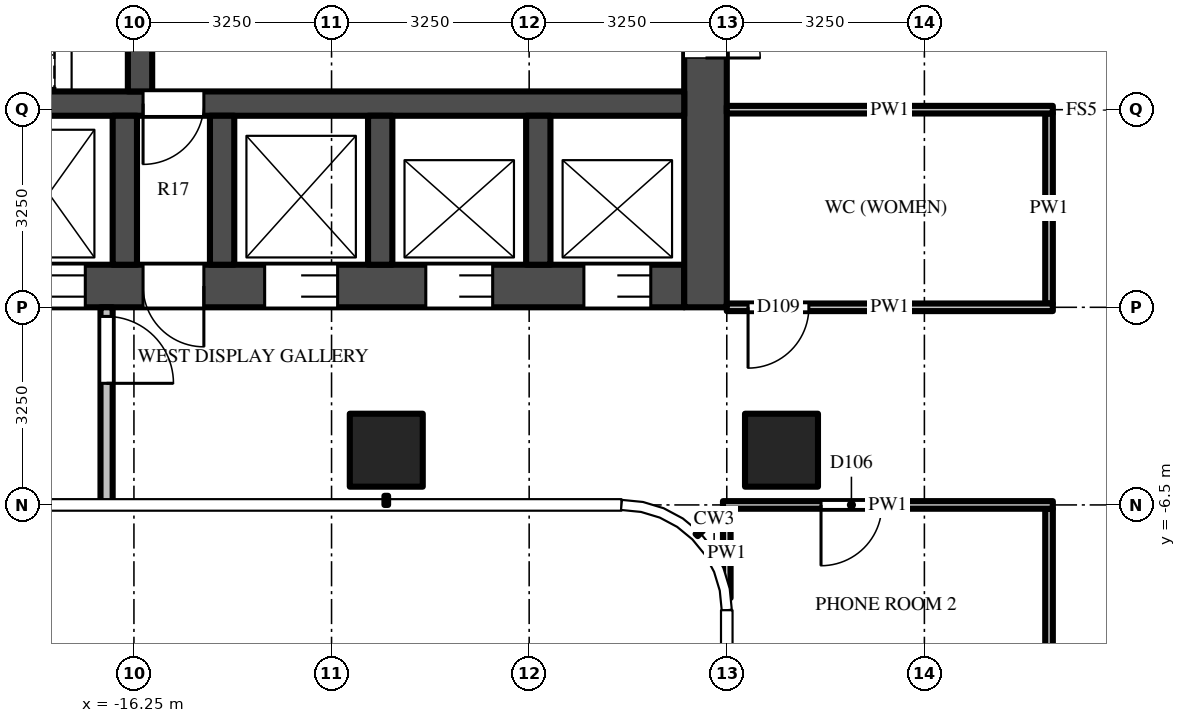
"""IFC4 building model, lengths in metres.
Left out: names, types, materials, properties, quantities, classifications, styles, units other than length and angle.
Written with IfcOpenShell. Run it as: python <this file> out.ifc"""

import sys

from ifc_helpers import new_model, si_unit, direction, frame, frame_2d, origin, origin_2d, place, context, subcontext, project, spatial, rectangle, extrude, source, transform, mapped, element, fill, save


model = new_model("IFC4")
c1 = context("Model", 3, precision=1e-05, world=origin(), true_north=direction((0.0, 1.0)))
c2 = subcontext(c1, "Body", "Model", "MODEL_VIEW")
j1 = project(units=[si_unit("LENGTHUNIT", "METRE"), si_unit("PLANEANGLEUNIT", "RADIAN")], contexts=[c1])
p1 = place(None, origin())
s1 = spatial("IfcSite", under=j1, at=p1, CompositionType="ELEMENT")
p2 = place(p1, origin())
s2 = spatial("IfcBuilding", under=s1, at=p2, CompositionType="ELEMENT")
p3 = place(p2, frame((0.0, 0.0, 173.7)))
s3 = spatial("IfcBuildingStorey", under=s2, at=p3, CompositionType="ELEMENT", Elevation=173.7)
m1 = source(origin(), c2, "Body", "SweptSolid", [
    extrude(rectangle(XDim=1.2, YDim=1.2, at=origin_2d()), origin(), (0.0, 0.0, 1.0), 3.9),
])
for number, where, z_axis, x_axis in (
    (1, (-5.6, -5.6, 0.0), (0.0, 0.0, 1.0), (1.0, 0.0, 0.0)),
    (2, (-12.1, -5.6, 0.0), (0.0, 0.0, 1.0), (1.0, 0.0, 0.0)),
):
    element("IfcColumn", number, at=place(p3, frame(where, z_axis=z_axis, x_axis=x_axis)), inside=s3, PredefinedType="COLUMN", context=c2, shape_type="MappedRepresentation", body=[
        mapped(m1, transform((0.0, 0.0, 0.0))),
    ])
m2 = source(origin(), c2, "Body", "SweptSolid", [
    extrude(rectangle(XDim=14.85, YDim=0.7, at=frame_2d((7.425, 0.0))), origin(), (0.0, 0.0, 1.0), 3.7),
])
p4 = place(p3, frame((-7.2, -2.9, 0.0), z_axis=(0.0, 0.0, 1.0), x_axis=(-1.0, 0.0, 0.0)))
e3 = element("IfcWall", 3, at=p4, inside=s3, PredefinedType="SHEAR", context=c2, shape_type="MappedRepresentation", body=[
    mapped(m2, transform((0.0, 0.0, 0.0))),
])
m3 = source(origin(), c2, "Body", "SweptSolid", [
    extrude(rectangle(XDim=1.1, YDim=2.1, at=frame_2d((0.55, 1.05))), frame((0.0, 0.36, 0.0), z_axis=(0.0, -1.0, 0.0), x_axis=(1.0, 0.0, 0.0)), (0.0, 0.0, 1.0), 0.72),
])
p5 = place(p4, frame((0.55, 0.0, 0.0)))
e4 = element("IfcOpeningElement", 4, at=p5, cuts=e3, PredefinedType="OPENING", context=c2, shape_type="MappedRepresentation", body=[
    mapped(m3, transform((0.0, 0.0, 0.0))),
])
p6 = place(p4, frame((3.15, 0.0, 0.0)))
e5 = element("IfcOpeningElement", 5, at=p6, cuts=e3, PredefinedType="OPENING", context=c2, shape_type="MappedRepresentation", body=[
    mapped(m3, transform((0.0, 0.0, 0.0))),
])
m4 = source(origin(), c2, "Body", "SweptSolid", [
    extrude(rectangle(XDim=1.2, YDim=2.1, at=frame_2d((0.6, 1.05))), frame((0.0, 0.36, 0.0), z_axis=(0.0, -1.0, 0.0), x_axis=(1.0, 0.0, 0.0)), (0.0, 0.0, 1.0), 0.72),
])
p7 = place(p4, frame((5.7, 0.0, 0.0)))
e6 = element("IfcOpeningElement", 6, at=p7, cuts=e3, PredefinedType="OPENING", context=c2, shape_type="MappedRepresentation", body=[
    mapped(m4, transform((0.0, 0.0, 0.0))),
])
m5 = source(origin(), c2, "Body", "SweptSolid", [
    extrude(rectangle(XDim=1.3, YDim=2.1, at=frame_2d((0.65, 1.05))), frame((0.0, 0.36, 0.0), z_axis=(0.0, -1.0, 0.0), x_axis=(1.0, 0.0, 0.0)), (0.0, 0.0, 1.0), 0.72),
])
p8 = place(p4, frame((12.2, 0.0, 0.0)))
e7 = element("IfcOpeningElement", 7, at=p8, cuts=e3, PredefinedType="OPENING", context=c2, shape_type="MappedRepresentation", body=[
    mapped(m5, transform((0.0, 0.0, 0.0))),
])
p9 = place(p4, frame((9.85, 0.0, 0.0)))
e8 = element("IfcOpeningElement", 8, at=p9, cuts=e3, PredefinedType="OPENING", context=c2, shape_type="MappedRepresentation", body=[
    mapped(m4, transform((0.0, 0.0, 0.0))),
])
m6 = source(origin(), c2, "Body", "SweptSolid", [
    extrude(rectangle(XDim=1.0, YDim=2.1, at=frame_2d((0.5, 1.05))), frame((0.0, 0.36, 0.0), z_axis=(0.0, -1.0, 0.0), x_axis=(1.0, 0.0, 0.0)), (0.0, 0.0, 1.0), 0.72),
])
p10 = place(p4, frame((7.9, 0.0, 0.0)))
e9 = element("IfcOpeningElement", 9, at=p10, cuts=e3, PredefinedType="OPENING", context=c2, shape_type="MappedRepresentation", body=[
    mapped(m6, transform((0.0, 0.0, 0.0))),
])
m7 = source(origin(), c2, "Body", "SweptSolid", [
    extrude(rectangle(XDim=9.05, YDim=0.7, at=frame_2d((4.525, 0.0))), origin(), (0.0, 0.0, 1.0), 3.7),
])
p11 = place(p3, frame((-6.85, 5.8, 0.0), z_axis=(0.0, 0.0, 1.0), x_axis=(0.0, -1.0, 0.0)))
e10 = element("IfcWall", 10, at=p11, inside=s3, PredefinedType="SHEAR", context=c2, shape_type="MappedRepresentation", body=[
    mapped(m7, transform((0.0, 0.0, 0.0))),
])
m8 = source(origin(), c2, "Body", "SweptSolid", [
    extrude(rectangle(XDim=1.8, YDim=2.1, at=frame_2d((0.9, 1.05))), frame((0.0, 0.36, 0.0), z_axis=(0.0, -1.0, 0.0), x_axis=(1.0, 0.0, 0.0)), (0.0, 0.0, 1.0), 0.72),
])
p12 = place(p11, frame((3.15, 0.0, 0.0)))
e11 = element("IfcOpeningElement", 11, at=p12, cuts=e10, PredefinedType="OPENING", context=c2, shape_type="MappedRepresentation", body=[
    mapped(m8, transform((0.0, 0.0, 0.0))),
])
m9 = source(origin(), c2, "Body", "SweptSolid", [
    extrude(rectangle(XDim=14.85, YDim=0.4, at=frame_2d((7.425, 0.0))), origin(), (0.0, 0.0, 1.0), 3.7),
])
p13 = place(p3, frame((-7.2, 0.1, 0.0), z_axis=(0.0, 0.0, 1.0), x_axis=(-1.0, 0.0, 0.0)))
e12 = element("IfcWall", 12, at=p13, inside=s3, PredefinedType="SHEAR", context=c2, shape_type="MappedRepresentation", body=[
    mapped(m9, transform((0.0, 0.0, 0.0))),
])
m10 = source(origin(), c2, "Body", "SweptSolid", [
    extrude(rectangle(XDim=1.0, YDim=2.1, at=frame_2d((0.5, 1.05))), frame((0.0, 0.21, 0.0), z_axis=(0.0, -1.0, 0.0), x_axis=(1.0, 0.0, 0.0)), (0.0, 0.0, 1.0), 0.42),
])
p14 = place(p13, frame((7.9, 0.0, 0.0)))
e13 = element("IfcOpeningElement", 13, at=p14, cuts=e12, PredefinedType="OPENING", context=c2, shape_type="MappedRepresentation", body=[
    mapped(m10, transform((0.0, 0.0, 0.0))),
])
m11 = source(origin(), c2, "Body", "SweptSolid", [
    extrude(rectangle(XDim=5.5, YDim=0.4, at=frame_2d((2.75, 0.0))), origin(), (0.0, 0.0, 1.0), 3.7),
])
p15 = place(p3, frame((-16.15, 5.8, 0.0), z_axis=(0.0, 0.0, 1.0), x_axis=(0.0, -1.0, 0.0)))
e14 = element("IfcWall", 14, at=p15, inside=s3, PredefinedType="SHEAR", context=c2, shape_type="MappedRepresentation", body=[
    mapped(m11, transform((0.0, 0.0, 0.0))),
])
m12 = source(origin(), c2, "Body", "SweptSolid", [
    extrude(rectangle(XDim=1.1, YDim=2.1, at=frame_2d((0.55, 1.05))), frame((0.0, 0.21, 0.0), z_axis=(0.0, -1.0, 0.0), x_axis=(1.0, 0.0, 0.0)), (0.0, 0.0, 1.0), 0.42),
])
p16 = place(p15, frame((0.725, 0.0, 0.0)))
e15 = element("IfcOpeningElement", 15, at=p16, cuts=e14, PredefinedType="OPENING", context=c2, shape_type="MappedRepresentation", body=[
    mapped(m12, transform((0.0, 0.0, 0.0))),
])
p17 = place(p15, frame((3.675, 0.0, 0.0)))
e16 = element("IfcOpeningElement", 16, at=p17, cuts=e14, PredefinedType="OPENING", context=c2, shape_type="MappedRepresentation", body=[
    mapped(m12, transform((0.0, 0.0, 0.0))),
])
m13 = source(origin(), c2, "Body", "SweptSolid", [
    extrude(rectangle(XDim=2.45, YDim=0.4, at=frame_2d((1.225, 0.0))), origin(), (0.0, 0.0, 1.0), 3.7),
])
for number, where, z_axis, x_axis in (
    (17, (-9.6, -0.1, 0.0), (0.0, 0.0, 1.0), (0.0, -1.0, 0.0)),
    (18, (-12.2, -0.1, 0.0), (0.0, 0.0, 1.0), (0.0, -1.0, 0.0)),
    (19, (-14.8, -0.1, 0.0), (0.0, 0.0, 1.0), (0.0, -1.0, 0.0)),
    (20, (-16.4, -0.1, 0.0), (0.0, 0.0, 1.0), (0.0, -1.0, 0.0)),
):
    element("IfcWall", number, at=place(p3, frame(where, z_axis=z_axis, x_axis=x_axis)), inside=s3, PredefinedType="SHEAR", context=c2, shape_type="MappedRepresentation", body=[
        mapped(m13, transform((0.0, 0.0, 0.0))),
    ])
m14 = source(origin(), c2, "Body", "SweptSolid", [
    extrude(rectangle(XDim=3.25, YDim=0.2, at=frame_2d((1.625, 0.0))), origin(), (0.0, 0.0, 1.0), 3.7),
])
p18 = place(p3, frame((-16.7, -3.25, 0.0), z_axis=(0.0, 0.0, 1.0), x_axis=(0.0, -1.0, 0.0)))
e21 = element("IfcWall", 21, at=p18, inside=s3, PredefinedType="PARTITIONING", context=c2, shape_type="MappedRepresentation", body=[
    mapped(m14, transform((0.0, 0.0, 0.0))),
])
m15 = source(origin(), c2, "Body", "SweptSolid", [
    extrude(rectangle(XDim=1.1, YDim=2.1, at=frame_2d((0.55, 1.05))), frame((0.0, 0.11, 0.0), z_axis=(0.0, -1.0, 0.0), x_axis=(1.0, 0.0, 0.0)), (0.0, 0.0, 1.0), 0.22),
])
p19 = place(p18, frame((0.15, 0.0, 0.0)))
e22 = element("IfcOpeningElement", 22, at=p19, cuts=e21, PredefinedType="OPENING", context=c2, shape_type="MappedRepresentation", body=[
    mapped(m15, transform((0.0, 0.0, 0.0))),
])
m16 = source(origin(), c2, "Body", "SweptSolid", [
    extrude(rectangle(XDim=1.469, YDim=0.125, at=frame_2d((0.734, 0.0))), origin(), (0.0, 0.0, 1.0), 3.7),
])
p20 = place(p3, frame((-6.5, -6.562, 0.0), z_axis=(0.0, 0.0, 1.0), x_axis=(0.0, -1.0, 0.0)))
e23 = element("IfcWall", 23, at=p20, inside=s3, PredefinedType="PARTITIONING", context=c2, shape_type="MappedRepresentation", body=[
    mapped(m16, transform((0.0, 0.0, 0.0))),
])
m17 = source(origin(), c2, "Body", "SweptSolid", [
    extrude(rectangle(XDim=5.475, YDim=0.125, at=frame_2d((2.738, 0.0))), origin(), (0.0, 0.0, 1.0), 2.997),
])
p21 = place(p3, frame((-1.2, -6.562, 0.0), z_axis=(0.0, 0.0, 1.0), x_axis=(0.0, -1.0, 0.0)))
e24 = element("IfcWall", 24, at=p21, inside=s3, PredefinedType="PARTITIONING", context=c2, shape_type="MappedRepresentation", body=[
    mapped(m17, transform((0.0, 0.0, 0.0))),
])
m18 = source(origin(), c2, "Body", "SweptSolid", [
    extrude(rectangle(XDim=1.0, YDim=2.1, at=frame_2d((0.5, 1.05))), frame((0.0, 0.073, 0.0), z_axis=(0.0, -1.0, 0.0), x_axis=(1.0, 0.0, 0.0)), (0.0, 0.0, 1.0), 0.145),
])
p22 = place(p21, frame((3.538, 0.0, 0.0)))
e25 = element("IfcOpeningElement", 25, at=p22, cuts=e24, PredefinedType="OPENING", context=c2, shape_type="MappedRepresentation", body=[
    mapped(m18, transform((0.0, 0.0, 0.0))),
])
m19 = source(origin(), c2, "Body", "SweptSolid", [
    extrude(rectangle(XDim=3.125, YDim=0.125, at=frame_2d((1.562, 0.0))), origin(), (0.0, 0.0, 1.0), 3.068),
])
p23 = place(p3, frame((-1.2, -0.062, 0.0), z_axis=(0.0, 0.0, 1.0), x_axis=(0.0, -1.0, 0.0)))
e26 = element("IfcWall", 26, at=p23, inside=s3, PredefinedType="PARTITIONING", context=c2, shape_type="MappedRepresentation", body=[
    mapped(m19, transform((0.0, 0.0, 0.0))),
])
m20 = source(origin(), c2, "Body", "SweptSolid", [
    extrude(rectangle(XDim=5.425, YDim=0.125, at=frame_2d((2.712, 0.0))), origin(), (0.0, 0.0, 1.0), 2.78),
])
p24 = place(p3, frame((-1.137, -6.5, 0.0), z_axis=(0.0, 0.0, 1.0), x_axis=(-1.0, 0.0, 0.0)))
e27 = element("IfcWall", 27, at=p24, inside=s3, PredefinedType="PARTITIONING", context=c2, shape_type="MappedRepresentation", body=[
    mapped(m20, transform((0.0, 0.0, 0.0))),
])
p25 = place(p24, frame((2.812, 0.0, 0.0)))
e28 = element("IfcOpeningElement", 28, at=p25, cuts=e27, PredefinedType="OPENING", context=c2, shape_type="MappedRepresentation", body=[
    mapped(m18, transform((0.0, 0.0, 0.0))),
])
m21 = source(origin(), c2, "Body", "SweptSolid", [
    extrude(rectangle(XDim=5.363, YDim=0.125, at=frame_2d((2.681, 0.0))), origin(), (0.0, 0.0, 1.0), 2.997),
])
p26 = place(p3, frame((-1.137, -3.25, 0.0), z_axis=(0.0, 0.0, 1.0), x_axis=(-1.0, 0.0, 0.0)))
e29 = element("IfcWall", 29, at=p26, inside=s3, PredefinedType="PARTITIONING", context=c2, shape_type="MappedRepresentation", body=[
    mapped(m21, transform((0.0, 0.0, 0.0))),
])
p27 = place(p26, frame((4.012, 0.0, 0.0)))
e30 = element("IfcOpeningElement", 30, at=p27, cuts=e29, PredefinedType="OPENING", context=c2, shape_type="MappedRepresentation", body=[
    mapped(m18, transform((0.0, 0.0, 0.0))),
])
p28 = place(p3, frame((-1.137, 0.0, 0.0), z_axis=(0.0, 0.0, 1.0), x_axis=(-1.0, 0.0, 0.0)))
e31 = element("IfcWall", 31, at=p28, inside=s3, PredefinedType="PARTITIONING", context=c2, shape_type="MappedRepresentation", body=[
    mapped(m21, transform((0.0, 0.0, 0.0))),
])
m22 = source(origin(), c2, "Body", "SweptSolid", [
    extrude(rectangle(XDim=1.1, YDim=2.1, at=frame_2d((0.55, 1.05))), frame((0.0, -0.275, 0.0), z_axis=(0.0, -1.0, 0.0), x_axis=(1.0, 0.0, 0.0)), (0.0, 0.0, 1.0), 0.05),
])
p29 = place(p5, origin())
e32 = element("IfcDoor", 32, at=p29, inside=s3, OperationType="DOUBLE_DOOR_SLIDING", PredefinedType="DOOR", context=c2, shape_type="MappedRepresentation", body=[
    mapped(m22, transform((0.0, 0.0, 0.0))),
])
fill(e4, e32)
p30 = place(p6, origin())
e33 = element("IfcDoor", 33, at=p30, inside=s3, OperationType="DOUBLE_DOOR_SLIDING", PredefinedType="DOOR", context=c2, shape_type="MappedRepresentation", body=[
    mapped(m22, transform((0.0, 0.0, 0.0))),
])
fill(e5, e33)
m23 = source(origin(), c2, "Body", "SweptSolid", [
    extrude(rectangle(XDim=1.2, YDim=2.1, at=frame_2d((0.6, 1.05))), frame((0.0, -0.275, 0.0), z_axis=(0.0, -1.0, 0.0), x_axis=(1.0, 0.0, 0.0)), (0.0, 0.0, 1.0), 0.05),
])
p31 = place(p7, origin())
e34 = element("IfcDoor", 34, at=p31, inside=s3, OperationType="DOUBLE_DOOR_SLIDING", PredefinedType="DOOR", context=c2, shape_type="MappedRepresentation", body=[
    mapped(m23, transform((0.0, 0.0, 0.0))),
])
fill(e6, e34)
p32 = place(p9, origin())
e35 = element("IfcDoor", 35, at=p32, inside=s3, OperationType="DOUBLE_DOOR_SLIDING", PredefinedType="DOOR", context=c2, shape_type="MappedRepresentation", body=[
    mapped(m23, transform((0.0, 0.0, 0.0))),
])
fill(e8, e35)
m24 = source(origin(), c2, "Body", "SweptSolid", [
    extrude(rectangle(XDim=1.8, YDim=2.1, at=frame_2d((0.9, 1.05))), frame((0.0, -0.275, 0.0), z_axis=(0.0, -1.0, 0.0), x_axis=(1.0, 0.0, 0.0)), (0.0, 0.0, 1.0), 0.05),
])
p33 = place(p12, origin())
e36 = element("IfcDoor", 36, at=p33, inside=s3, OperationType="DOUBLE_DOOR_SINGLE_SWING", PredefinedType="DOOR", context=c2, shape_type="MappedRepresentation", body=[
    mapped(m24, transform((0.0, 0.0, 0.0))),
])
fill(e11, e36)
m25 = source(origin(), c2, "Body", "SweptSolid", [
    extrude(rectangle(XDim=1.0, YDim=2.1, at=frame_2d((0.5, 1.05))), frame((0.0, 0.025, 0.0), z_axis=(0.0, -1.0, 0.0), x_axis=(1.0, 0.0, 0.0)), (0.0, 0.0, 1.0), 0.05),
])
p34 = place(p14, origin())
e37 = element("IfcDoor", 37, at=p34, inside=s3, OperationType="SINGLE_SWING_RIGHT", PredefinedType="DOOR", context=c2, shape_type="MappedRepresentation", body=[
    mapped(m25, transform((0.0, 0.0, 0.0))),
])
fill(e13, e37)
m26 = source(origin(), c2, "Body", "SweptSolid", [
    extrude(rectangle(XDim=1.0, YDim=2.1, at=frame_2d((0.5, 1.05))), frame((0.0, -0.275, 0.0), z_axis=(0.0, -1.0, 0.0), x_axis=(1.0, 0.0, 0.0)), (0.0, 0.0, 1.0), 0.05),
])
p35 = place(p10, origin())
e38 = element("IfcDoor", 38, at=p35, inside=s3, OperationType="SINGLE_SWING_LEFT", PredefinedType="DOOR", context=c2, shape_type="MappedRepresentation", body=[
    mapped(m26, transform((0.0, 0.0, 0.0))),
])
fill(e9, e38)
m27 = source(origin(), c2, "Body", "SweptSolid", [
    extrude(rectangle(XDim=1.1, YDim=2.1, at=frame_2d((0.55, 1.05))), frame((0.0, 0.025, 0.0), z_axis=(0.0, -1.0, 0.0), x_axis=(1.0, 0.0, 0.0)), (0.0, 0.0, 1.0), 0.05),
])
p36 = place(p19, origin())
e39 = element("IfcDoor", 39, at=p36, inside=s3, OperationType="SINGLE_SWING_RIGHT", PredefinedType="DOOR", context=c2, shape_type="MappedRepresentation", body=[
    mapped(m27, transform((0.0, 0.0, 0.0))),
])
fill(e22, e39)
p37 = place(p25, origin())
e40 = element("IfcDoor", 40, at=p37, inside=s3, OperationType="SINGLE_SWING_RIGHT", PredefinedType="DOOR", context=c2, shape_type="MappedRepresentation", body=[
    mapped(m25, transform((0.0, 0.0, 0.0))),
])
fill(e28, e40)
p38 = place(p27, origin())
e41 = element("IfcDoor", 41, at=p38, inside=s3, OperationType="SINGLE_SWING_RIGHT", PredefinedType="DOOR", context=c2, shape_type="MappedRepresentation", body=[
    mapped(m25, transform((0.0, 0.0, 0.0))),
])
fill(e30, e41)
save(model, sys.argv[1])
